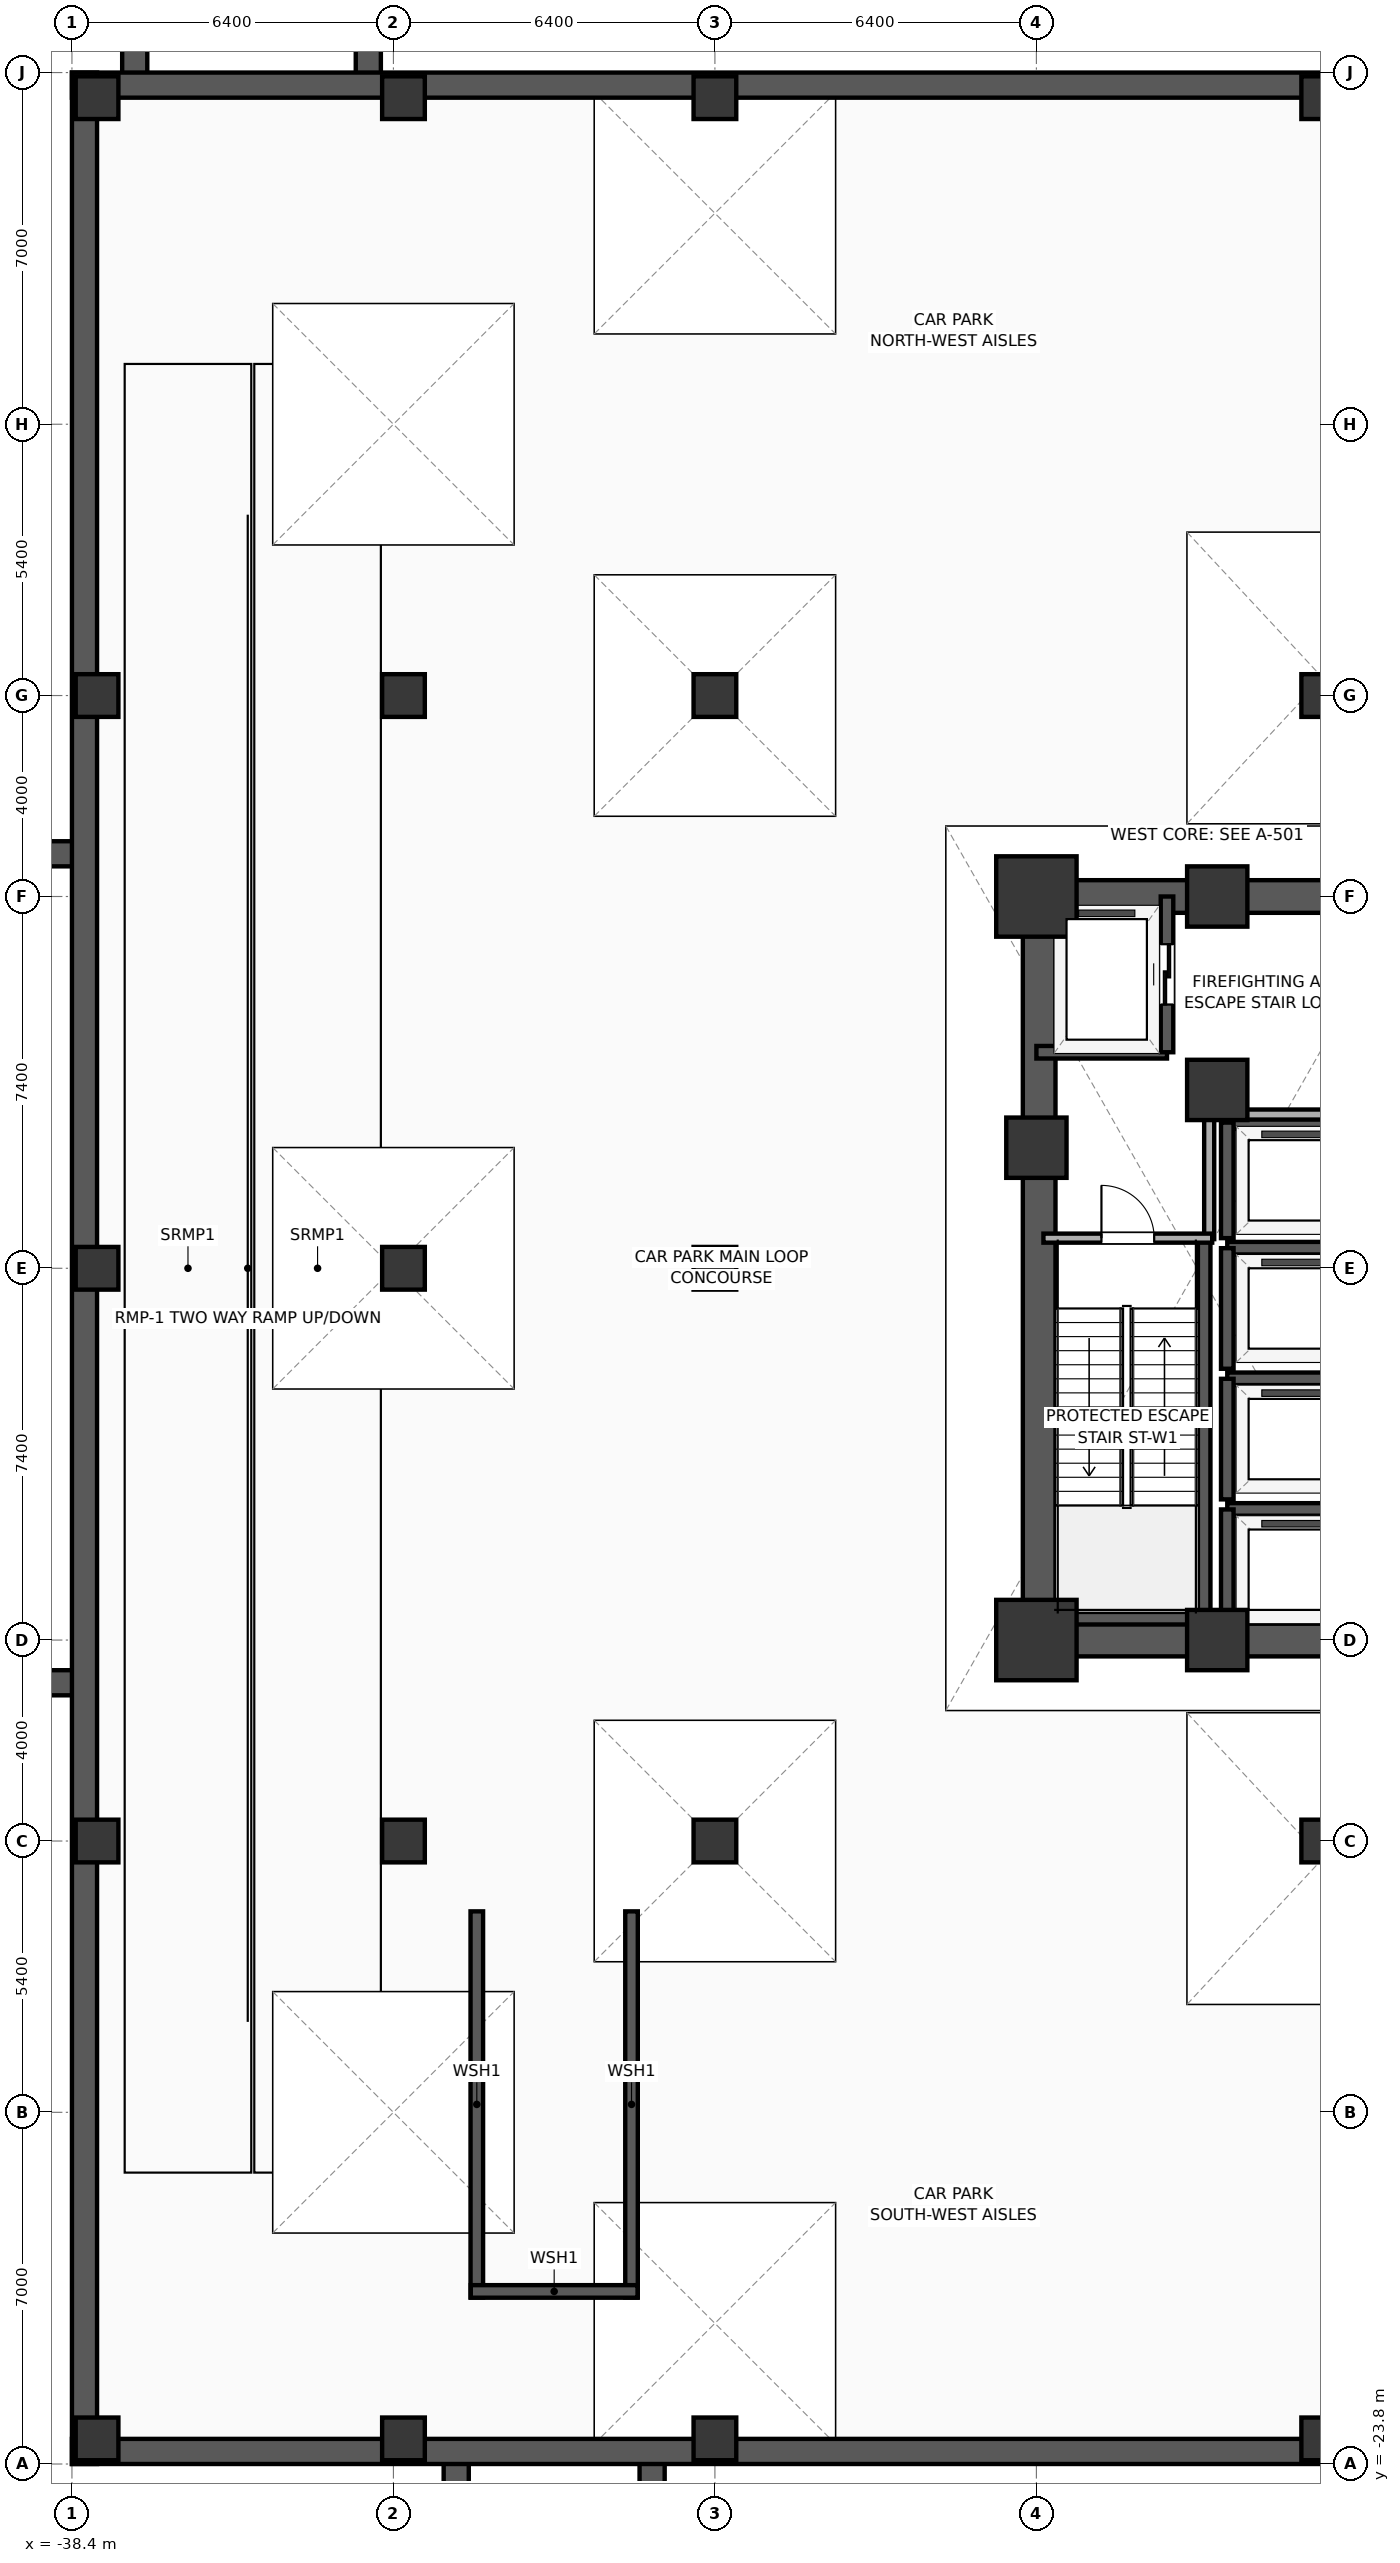
"""IFC4 building model, lengths in metres.
Left out: names, types, materials, properties, quantities, classifications, styles, units other than length and angle.
Written with IfcOpenShell. Run it as: python <this file> out.ifc"""

import sys

from ifc_helpers import new_model, si_unit, direction, frame, frame_2d, origin, origin_2d, place, context, subcontext, project, spatial, rectangle, extrude, element, fill, save


model = new_model("IFC4")
c1 = context("Model", 3, precision=1e-05, world=origin(), true_north=direction((0.0, 1.0)))
c2 = subcontext(c1, "Body", "Model", "MODEL_VIEW")
j1 = project(units=[si_unit("LENGTHUNIT", "METRE"), si_unit("PLANEANGLEUNIT", "RADIAN")], contexts=[c1])
p1 = place(None, origin())
s1 = spatial("IfcSite", under=j1, at=p1, CompositionType="ELEMENT")
p2 = place(p1, origin())
s2 = spatial("IfcBuilding", under=s1, at=p2, CompositionType="ELEMENT")
p3 = place(p2, frame((0.0, 0.0, -10.4)))
s3 = spatial("IfcBuildingStorey", under=s2, at=p3, CompositionType="ELEMENT", Elevation=-10.4)
for number, where, z_axis, x_axis in (
    (1, (-37.15, 23.55, 0.0), (0.0, 0.0, 1.0), (0.0, 1.0, 0.0)),
    (2, (-32.5, 23.55, 0.0), (0.0, 0.0, 1.0), (0.0, 1.0, 0.0)),
):
    element("IfcWall", number, at=place(p3, frame(where, z_axis=z_axis, x_axis=x_axis)), inside=s3, PredefinedType="USERDEFINED", context=c2, shape_type="SweptSolid", body=[
        extrude(rectangle(XDim=3.6, YDim=0.5, at=frame_2d((1.8, 0.0))), origin(), (0.0, 0.0, 1.0), 5.2),
    ])
for number, where, z_axis, x_axis in (
    (3, (-30.75, -26.95, 0.0), (0.0, 0.0, 1.0), (0.0, 1.0, 0.0)),
    (4, (-26.85, -26.95, 0.0), (0.0, 0.0, 1.0), (0.0, 1.0, 0.0)),
):
    element("IfcWall", number, at=place(p3, frame(where, z_axis=z_axis, x_axis=x_axis)), inside=s3, PredefinedType="USERDEFINED", context=c2, shape_type="SweptSolid", body=[
        extrude(rectangle(XDim=3.4, YDim=0.5, at=frame_2d((1.7, 0.0))), origin(), (0.0, 0.0, 1.0), 5.2),
    ])
for number, where, z_axis, x_axis in (
    (5, (-42.35, -8.25, 0.0), (0.0, 0.0, 1.0), (1.0, 0.0, 0.0)),
    (6, (-42.35, 8.25, 0.0), (0.0, 0.0, 1.0), (1.0, 0.0, 0.0)),
):
    element("IfcWall", number, at=place(p3, frame(where, z_axis=z_axis, x_axis=x_axis)), inside=s3, PredefinedType="USERDEFINED", context=c2, shape_type="SweptSolid", body=[
        extrude(rectangle(XDim=4.2, YDim=0.5, at=frame_2d((2.1, 0.0))), origin(), (0.0, 0.0, 1.0), 5.2),
    ])
p4 = place(p3, frame((-19.2, -7.4, 0.0), z_axis=(0.0, 0.0, 1.0), x_axis=(1.0, 0.0, 0.0)))
e7 = element("IfcColumn", 7, at=p4, inside=s3, PredefinedType="COLUMN", context=c2, shape_type="SweptSolid", body=[
    extrude(rectangle(XDim=1.6, YDim=1.6, at=origin_2d()), origin(), (0.0, 0.0, 1.0), 5.2),
])
p5 = place(p3, frame((-19.2, 2.4, 0.0), z_axis=(0.0, 0.0, 1.0), x_axis=(1.0, 0.0, 0.0)))
e8 = element("IfcColumn", 8, at=p5, inside=s3, PredefinedType="COLUMN", context=c2, shape_type="SweptSolid", body=[
    extrude(rectangle(XDim=1.2, YDim=1.2, at=origin_2d()), origin(), (0.0, 0.0, 1.0), 5.2),
])
p6 = place(p3, frame((-19.2, 7.4, 0.0), z_axis=(0.0, 0.0, 1.0), x_axis=(1.0, 0.0, 0.0)))
e9 = element("IfcColumn", 9, at=p6, inside=s3, PredefinedType="COLUMN", context=c2, shape_type="SweptSolid", body=[
    extrude(rectangle(XDim=1.6, YDim=1.6, at=origin_2d()), origin(), (0.0, 0.0, 1.0), 5.2),
])
for number, where, z_axis, x_axis in (
    (10, (-15.6, -7.4, 0.0), (0.0, 0.0, 1.0), (1.0, 0.0, 0.0)),
    (11, (-15.6, 7.4, 0.0), (0.0, 0.0, 1.0), (1.0, 0.0, 0.0)),
    (12, (-15.6, 3.55, 0.0), (0.0, 0.0, 1.0), (1.0, 0.0, 0.0)),
):
    element("IfcColumn", number, at=place(p3, frame(where, z_axis=z_axis, x_axis=x_axis)), inside=s3, PredefinedType="COLUMN", context=c2, shape_type="SweptSolid", body=[
        extrude(rectangle(XDim=1.2, YDim=1.2, at=origin_2d()), origin(), (0.0, 0.0, 1.0), 5.2),
    ])
for number, where, z_axis, x_axis in (
    (13, (-19.525, -7.4, 0.0), (0.0, 0.0, 1.0), (1.0, 0.0, 0.0)),
    (14, (-19.525, 7.4, 0.0), (0.0, 0.0, 1.0), (1.0, 0.0, 0.0)),
):
    element("IfcWall", number, at=place(p3, frame(where, z_axis=z_axis, x_axis=x_axis)), inside=s3, PredefinedType="SHEAR", context=c2, shape_type="SweptSolid", body=[
        extrude(rectangle(XDim=7.45, YDim=0.65, at=frame_2d((3.725, 0.0))), origin(), (0.0, 0.0, 1.0), 4.88),
    ])
p7 = place(p3, frame((-19.145, -7.4, 0.0), z_axis=(0.0, 0.0, 1.0), x_axis=(0.0, 1.0, 0.0)))
e15 = element("IfcWall", 15, at=p7, inside=s3, PredefinedType="SHEAR", context=c2, shape_type="SweptSolid", body=[
    extrude(rectangle(XDim=14.8, YDim=0.65, at=frame_2d((7.4, 0.0))), origin(), (0.0, 0.0, 1.0), 4.88),
])
p8 = place(p3, frame((-15.86, -7.085, 0.0), z_axis=(0.0, 0.0, 1.0), x_axis=(0.0, 1.0, 0.0)))
e16 = element("IfcWall", 16, at=p8, inside=s3, PredefinedType="SOLIDWALL", context=c2, shape_type="SweptSolid", body=[
    extrude(rectangle(XDim=7.685, YDim=0.25, at=frame_2d((3.843, 0.0))), origin(), (0.0, 0.0, 1.0), 4.88),
])
p9 = place(p3, frame((-19.2, -6.965, 0.0), z_axis=(0.0, 0.0, 1.0), x_axis=(1.0, 0.0, 0.0)))
e17 = element("IfcWall", 17, at=p9, inside=s3, PredefinedType="SOLIDWALL", context=c2, shape_type="SweptSolid", body=[
    extrude(rectangle(XDim=3.46, YDim=0.25, at=frame_2d((1.73, 0.0))), origin(), (0.0, 0.0, 1.0), 4.88),
])
for number, where, z_axis, x_axis in (
    (18, (-30.34, -20.485, 0.0), (0.0, 0.0, 1.0), (0.0, 1.0, 0.0)),
    (19, (-27.26, -20.485, 0.0), (0.0, 0.0, 1.0), (0.0, 1.0, 0.0)),
):
    element("IfcWall", number, at=place(p3, frame(where, z_axis=z_axis, x_axis=x_axis)), inside=s3, PredefinedType="SOLIDWALL", context=c2, shape_type="SweptSolid", body=[
        extrude(rectangle(XDim=7.685, YDim=0.25, at=frame_2d((3.843, 0.0))), origin(), (0.0, 0.0, 1.0), 4.88),
    ])
p10 = place(p3, frame((-30.46, -20.365, 0.0), z_axis=(0.0, 0.0, 1.0), x_axis=(1.0, 0.0, 0.0)))
e20 = element("IfcWall", 20, at=p10, inside=s3, PredefinedType="SOLIDWALL", context=c2, shape_type="SweptSolid", body=[
    extrude(rectangle(XDim=3.32, YDim=0.25, at=frame_2d((1.66, 0.0))), origin(), (0.0, 0.0, 1.0), 4.88),
])
for number, where, z_axis, x_axis in (
    (21, (-38.4, -23.55, 0.0), (0.0, 0.0, 1.0), (1.0, 0.0, 0.0)),
    (22, (-38.4, 23.55, 0.0), (0.0, 0.0, 1.0), (1.0, 0.0, 0.0)),
):
    element("IfcWall", number, at=place(p3, frame(where, z_axis=z_axis, x_axis=x_axis)), inside=s3, PredefinedType="USERDEFINED", context=c2, shape_type="SweptSolid", body=[
        extrude(rectangle(XDim=74.0, YDim=0.5, at=frame_2d((37.0, 0.0))), origin(), (0.0, 0.0, 1.0), 4.88),
    ])
p11 = place(p3, frame((-38.15, -23.8, 0.0), z_axis=(0.0, 0.0, 1.0), x_axis=(0.0, 1.0, 0.0)))
e23 = element("IfcWall", 23, at=p11, inside=s3, PredefinedType="USERDEFINED", context=c2, shape_type="SweptSolid", body=[
    extrude(rectangle(XDim=47.6, YDim=0.5, at=frame_2d((23.8, 0.0))), origin(), (0.0, 0.0, 1.0), 4.88),
])
for number, where, z_axis, x_axis in (
    (24, (-37.9, -23.3, 0.0), (0.0, 0.0, 1.0), (1.0, 0.0, 0.0)),
    (25, (-37.9, -11.4, 0.0), (0.0, 0.0, 1.0), (1.0, 0.0, 0.0)),
    (26, (-37.9, 0.0, 0.0), (0.0, 0.0, 1.0), (1.0, 0.0, 0.0)),
    (27, (-37.9, 11.4, 0.0), (0.0, 0.0, 1.0), (1.0, 0.0, 0.0)),
    (28, (-37.9, 23.3, 0.0), (0.0, 0.0, 1.0), (1.0, 0.0, 0.0)),
    (29, (-31.8, -23.3, 0.0), (0.0, 0.0, 1.0), (1.0, 0.0, 0.0)),
    (30, (-31.8, -11.4, 0.0), (0.0, 0.0, 1.0), (1.0, 0.0, 0.0)),
    (31, (-31.8, 0.0, 0.0), (0.0, 0.0, 1.0), (1.0, 0.0, 0.0)),
    (32, (-31.8, 11.4, 0.0), (0.0, 0.0, 1.0), (1.0, 0.0, 0.0)),
    (33, (-31.8, 23.3, 0.0), (0.0, 0.0, 1.0), (1.0, 0.0, 0.0)),
    (34, (-25.6, -23.3, 0.0), (0.0, 0.0, 1.0), (1.0, 0.0, 0.0)),
    (35, (-25.6, -11.4, 0.0), (0.0, 0.0, 1.0), (1.0, 0.0, 0.0)),
    (36, (-25.6, 0.0, 0.0), (0.0, 0.0, 1.0), (1.0, 0.0, 0.0)),
    (37, (-25.6, 11.4, 0.0), (0.0, 0.0, 1.0), (1.0, 0.0, 0.0)),
    (38, (-25.6, 23.3, 0.0), (0.0, 0.0, 1.0), (1.0, 0.0, 0.0)),
    (39, (-13.5, -23.3, 0.0), (0.0, 0.0, 1.0), (1.0, 0.0, 0.0)),
    (40, (-13.5, -11.4, 0.0), (0.0, 0.0, 1.0), (1.0, 0.0, 0.0)),
    (41, (-13.5, 11.4, 0.0), (0.0, 0.0, 1.0), (1.0, 0.0, 0.0)),
    (42, (-13.5, 23.3, 0.0), (0.0, 0.0, 1.0), (1.0, 0.0, 0.0)),
):
    element("IfcColumn", number, at=place(p3, frame(where, z_axis=z_axis, x_axis=x_axis)), inside=s3, PredefinedType="COLUMN", context=c2, shape_type="SweptSolid", body=[
        extrude(rectangle(XDim=0.85, YDim=0.85, at=origin_2d()), origin(), (0.0, 0.0, 1.0), 5.2),
    ])
p12 = place(p3, frame((-19.2, 4.3, 0.0), z_axis=(0.0, 0.0, 1.0), x_axis=(1.0, 0.0, 0.0)))
e43 = element("IfcWall", 43, at=p12, inside=s3, PredefinedType="SOLIDWALL", context=c2, shape_type="SweptSolid", body=[
    extrude(rectangle(XDim=2.6, YDim=0.25, at=frame_2d((1.3, 0.0))), origin(), (0.0, 0.0, 1.0), 4.88),
])
p13 = place(p3, frame((-16.6, 4.3, 0.0), z_axis=(0.0, 0.0, 1.0), x_axis=(0.0, 1.0, 0.0)))
e44 = element("IfcWall", 44, at=p13, inside=s3, PredefinedType="SOLIDWALL", context=c2, shape_type="SweptSolid", body=[
    extrude(rectangle(XDim=3.1, YDim=0.25, at=frame_2d((1.55, 0.0))), origin(), (0.0, 0.0, 1.0), 4.88),
])
p14 = place(p13, frame((0.95, 0.0, 0.0)))
e45 = element("IfcOpeningElement", 45, at=p14, cuts=e44, PredefinedType="OPENING", context=c2, shape_type="SweptSolid", body=[
    extrude(rectangle(XDim=1.2, YDim=2.05, at=frame_2d((0.6, 1.025))), frame((0.0, 0.135, 0.0), z_axis=(0.0, -1.0, 0.0), x_axis=(1.0, 0.0, 0.0)), (0.0, 0.0, 1.0), 0.27),
])
p15 = place(p3, frame((-12.4, -4.8, 0.0), z_axis=(0.0, 0.0, 1.0), x_axis=(-1.0, 0.0, 0.0)))
e46 = element("IfcWall", 46, at=p15, inside=s3, PredefinedType="SOLIDWALL", context=c2, shape_type="SweptSolid", body=[
    extrude(rectangle(XDim=3.0, YDim=0.25, at=frame_2d((1.5, 0.0))), origin(), (0.0, 0.0, 1.0), 4.88),
])
p16 = place(p3, frame((-15.4, -4.8, 0.0), z_axis=(0.0, 0.0, 1.0), x_axis=(0.0, -1.0, 0.0)))
e47 = element("IfcWall", 47, at=p16, inside=s3, PredefinedType="SOLIDWALL", context=c2, shape_type="SweptSolid", body=[
    extrude(rectangle(XDim=2.6, YDim=0.25, at=frame_2d((1.3, 0.0))), origin(), (0.0, 0.0, 1.0), 4.88),
])
p17 = place(p3, frame((-12.4, -2.2, 0.0), z_axis=(0.0, 0.0, 1.0), x_axis=(-1.0, 0.0, 0.0)))
e48 = element("IfcWall", 48, at=p17, inside=s3, PredefinedType="SOLIDWALL", context=c2, shape_type="SweptSolid", body=[
    extrude(rectangle(XDim=3.0, YDim=0.25, at=frame_2d((1.5, 0.0))), origin(), (0.0, 0.0, 1.0), 4.88),
])
p18 = place(p3, frame((-15.4, -2.2, 0.0), z_axis=(0.0, 0.0, 1.0), x_axis=(0.0, -1.0, 0.0)))
e49 = element("IfcWall", 49, at=p18, inside=s3, PredefinedType="SOLIDWALL", context=c2, shape_type="SweptSolid", body=[
    extrude(rectangle(XDim=2.4, YDim=0.25, at=frame_2d((1.2, 0.0))), origin(), (0.0, 0.0, 1.0), 4.88),
])
p19 = place(p3, frame((-12.4, 0.4, 0.0), z_axis=(0.0, 0.0, 1.0), x_axis=(-1.0, 0.0, 0.0)))
e50 = element("IfcWall", 50, at=p19, inside=s3, PredefinedType="SOLIDWALL", context=c2, shape_type="SweptSolid", body=[
    extrude(rectangle(XDim=3.0, YDim=0.25, at=frame_2d((1.5, 0.0))), origin(), (0.0, 0.0, 1.0), 4.88),
])
p20 = place(p3, frame((-15.4, 0.4, 0.0), z_axis=(0.0, 0.0, 1.0), x_axis=(0.0, -1.0, 0.0)))
e51 = element("IfcWall", 51, at=p20, inside=s3, PredefinedType="SOLIDWALL", context=c2, shape_type="SweptSolid", body=[
    extrude(rectangle(XDim=2.4, YDim=0.25, at=frame_2d((1.2, 0.0))), origin(), (0.0, 0.0, 1.0), 4.88),
])
p21 = place(p3, frame((-12.4, 2.9, 0.0), z_axis=(0.0, 0.0, 1.0), x_axis=(-1.0, 0.0, 0.0)))
e52 = element("IfcWall", 52, at=p21, inside=s3, PredefinedType="SOLIDWALL", context=c2, shape_type="SweptSolid", body=[
    extrude(rectangle(XDim=3.0, YDim=0.25, at=frame_2d((1.5, 0.0))), origin(), (0.0, 0.0, 1.0), 4.88),
])
p22 = place(p3, frame((-15.4, 2.9, 0.0), z_axis=(0.0, 0.0, 1.0), x_axis=(0.0, -1.0, 0.0)))
e53 = element("IfcWall", 53, at=p22, inside=s3, PredefinedType="SOLIDWALL", context=c2, shape_type="SweptSolid", body=[
    extrude(rectangle(XDim=2.3, YDim=0.25, at=frame_2d((1.15, 0.0))), origin(), (0.0, 0.0, 1.0), 4.88),
])
p23 = place(p3, frame((-15.76, 0.58, 0.0), z_axis=(0.0, 0.0, 1.0), x_axis=(0.0, 1.0, 0.0)))
e54 = element("IfcWall", 54, at=p23, inside=s3, PredefinedType="PARTITIONING", context=c2, shape_type="SweptSolid", body=[
    extrude(rectangle(XDim=2.52, YDim=0.2, at=frame_2d((1.26, 0.0))), origin(), (0.0, 0.0, 1.0), 4.88),
])
p24 = place(p3, frame((-15.82, 3.06, 0.0), z_axis=(0.0, 0.0, 1.0), x_axis=(1.0, 0.0, 0.0)))
e55 = element("IfcWall", 55, at=p24, inside=s3, PredefinedType="PARTITIONING", context=c2, shape_type="SweptSolid", body=[
    extrude(rectangle(XDim=3.16, YDim=0.2, at=frame_2d((1.58, 0.0))), origin(), (0.0, 0.0, 1.0), 4.88),
])
p25 = place(p3, frame((-19.06, 0.6, 0.0), z_axis=(0.0, 0.0, 1.0), x_axis=(1.0, 0.0, 0.0)))
e56 = element("IfcWall", 56, at=p25, inside=s3, PredefinedType="PARTITIONING", context=c2, shape_type="SweptSolid", body=[
    extrude(rectangle(XDim=3.36, YDim=0.18, at=frame_2d((1.68, 0.0))), origin(), (0.0, 0.0, 1.0), 4.88),
])
p26 = place(p25, frame((1.155, 0.0, 0.0)))
e57 = element("IfcOpeningElement", 57, at=p26, cuts=e56, PredefinedType="OPENING", context=c2, shape_type="SweptSolid", body=[
    extrude(rectangle(XDim=1.05, YDim=2.05, at=frame_2d((0.525, 1.025))), frame((0.0, 0.1, 0.0), z_axis=(0.0, -1.0, 0.0), x_axis=(1.0, 0.0, 0.0)), (0.0, 0.0, 1.0), 0.2),
])
p27 = place(p14, origin())
e58 = element("IfcDoor", 58, at=p27, inside=s3, OperationType="SLIDING_TO_LEFT", PredefinedType="DOOR", context=c2, shape_type="SweptSolid", body=[
    extrude(rectangle(XDim=1.2, YDim=2.05, at=frame_2d((0.6, 1.025))), frame((0.0, 0.025, 0.0), z_axis=(0.0, -1.0, 0.0), x_axis=(1.0, 0.0, 0.0)), (0.0, 0.0, 1.0), 0.05),
])
fill(e45, e58)
p28 = place(p26, origin())
e59 = element("IfcDoor", 59, at=p28, inside=s3, OperationType="SINGLE_SWING_LEFT", PredefinedType="DOOR", context=c2, shape_type="SweptSolid", body=[
    extrude(rectangle(XDim=1.05, YDim=2.05, at=frame_2d((0.525, 1.025))), frame((0.0, 0.025, 0.0), z_axis=(0.0, -1.0, 0.0), x_axis=(1.0, 0.0, 0.0)), (0.0, 0.0, 1.0), 0.05),
])
fill(e57, e59)
save(model, sys.argv[1])
